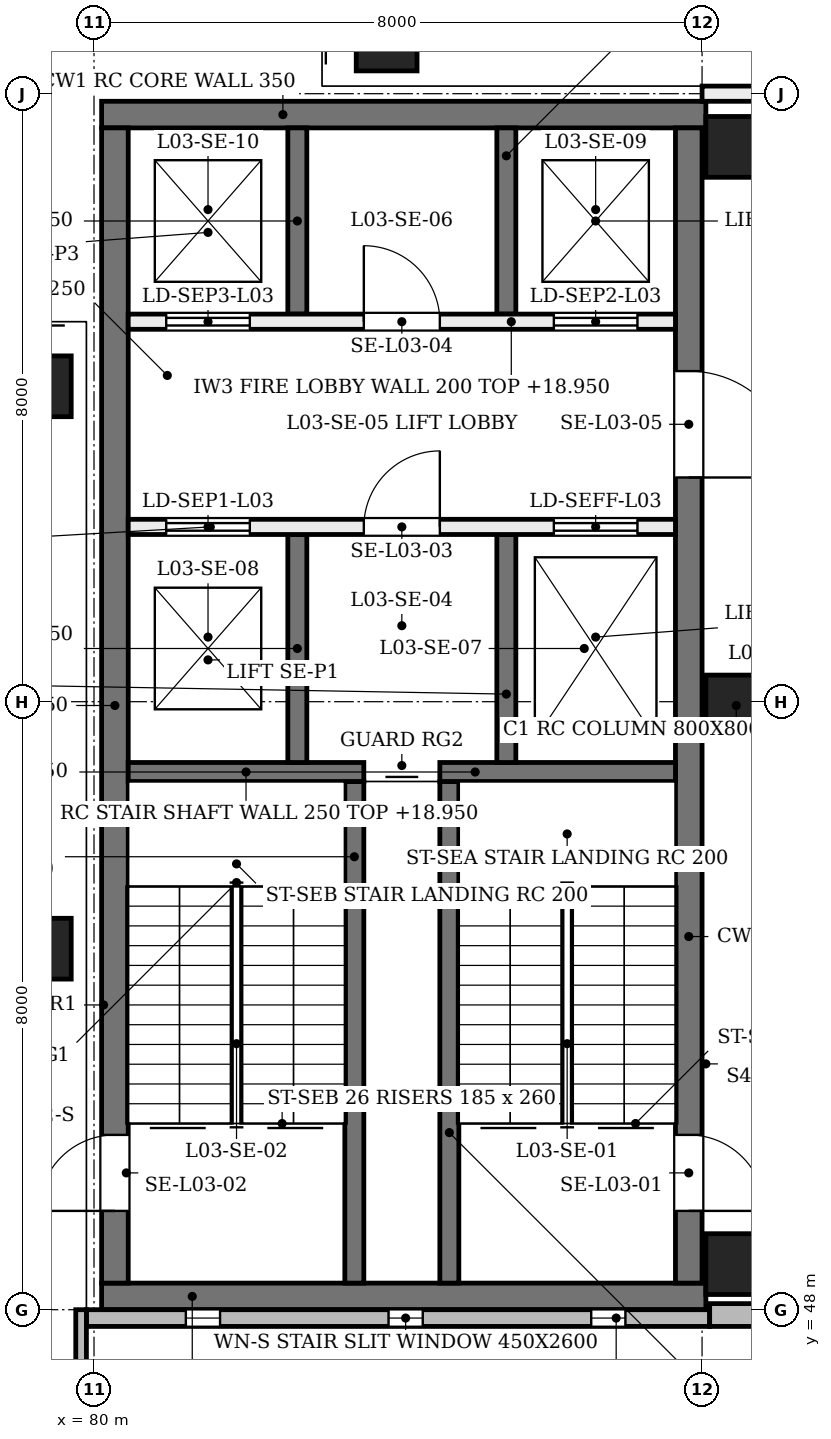
"""IFC4 building model, lengths in metres.
Left out: names, types, materials, properties, quantities, classifications, styles, units other than length and angle.
Written with IfcOpenShell. Run it as: python <this file> out.ifc"""

import sys

from ifc_helpers import new_model, si_unit, direction, frame, frame_2d, origin, origin_2d, place, context, subcontext, project, spatial, rectangle, extrude, element, fill, save


model = new_model("IFC4")
c1 = context("Model", 3, precision=1e-05, world=origin(), true_north=direction((0.0, 1.0)))
c2 = subcontext(c1, "Body", "Model", "MODEL_VIEW")
j1 = project(units=[si_unit("LENGTHUNIT", "METRE"), si_unit("PLANEANGLEUNIT", "RADIAN")], contexts=[c1])
p1 = place(None, origin())
s1 = spatial("IfcSite", under=j1, at=p1, CompositionType="ELEMENT")
p2 = place(p1, origin())
s2 = spatial("IfcBuilding", under=s1, at=p2, CompositionType="ELEMENT")
p3 = place(p2, frame((0.0, 0.0, 14.4)))
s3 = spatial("IfcBuildingStorey", under=s2, at=p3, CompositionType="ELEMENT", Elevation=14.4)
for number, where, z_axis, x_axis in (
    (1, (80.1, 48.175, 0.0), (0.0, 0.0, 1.0), (1.0, 0.0, 0.0)),
    (2, (80.1, 63.725, 0.0), (0.0, 0.0, 1.0), (1.0, 0.0, 0.0)),
):
    element("IfcWall", number, at=place(p3, frame(where, z_axis=z_axis, x_axis=x_axis)), inside=s3, PredefinedType="SHEAR", context=c2, shape_type="SweptSolid", body=[
        extrude(rectangle(XDim=7.95, YDim=0.35, at=frame_2d((3.975, 0.0))), origin(), (0.0, 0.0, 1.0), 4.58),
    ])
p4 = place(p3, frame((80.275, 48.35, 0.0), z_axis=(0.0, 0.0, 1.0), x_axis=(0.0, 1.0, 0.0)))
e3 = element("IfcWall", 3, at=p4, inside=s3, PredefinedType="SHEAR", context=c2, shape_type="SweptSolid", body=[
    extrude(rectangle(XDim=15.2, YDim=0.35, at=frame_2d((7.6, 0.0))), origin(), (0.0, 0.0, 1.0), 4.58),
])
p5 = place(p4, frame((0.95, 0.0, 0.0)))
e4 = element("IfcOpeningElement", 4, at=p5, cuts=e3, PredefinedType="OPENING", context=c2, shape_type="SweptSolid", body=[
    extrude(rectangle(XDim=1.0, YDim=2.1, at=frame_2d((0.5, 1.05))), frame((0.0, 0.185, 0.0), z_axis=(0.0, -1.0, 0.0), x_axis=(1.0, 0.0, 0.0)), (0.0, 0.0, 1.0), 0.37),
])
p6 = place(p3, frame((87.825, 48.35, 0.0), z_axis=(0.0, 0.0, 1.0), x_axis=(0.0, 1.0, 0.0)))
e5 = element("IfcWall", 5, at=p6, inside=s3, PredefinedType="SHEAR", context=c2, shape_type="SweptSolid", body=[
    extrude(rectangle(XDim=15.2, YDim=0.35, at=frame_2d((7.6, 0.0))), origin(), (0.0, 0.0, 1.0), 4.58),
])
p7 = place(p6, frame((0.95, 0.0, 0.0)))
e6 = element("IfcOpeningElement", 6, at=p7, cuts=e5, PredefinedType="OPENING", context=c2, shape_type="SweptSolid", body=[
    extrude(rectangle(XDim=1.0, YDim=2.1, at=frame_2d((0.5, 1.05))), frame((0.0, 0.185, 0.0), z_axis=(0.0, -1.0, 0.0), x_axis=(1.0, 0.0, 0.0)), (0.0, 0.0, 1.0), 0.37),
])
p8 = place(p6, frame((10.6, 0.0, 0.0)))
e7 = element("IfcOpeningElement", 7, at=p8, cuts=e5, PredefinedType="OPENING", context=c2, shape_type="SweptSolid", body=[
    extrude(rectangle(XDim=1.4, YDim=2.1, at=frame_2d((0.7, 1.05))), frame((0.0, 0.185, 0.0), z_axis=(0.0, -1.0, 0.0), x_axis=(1.0, 0.0, 0.0)), (0.0, 0.0, 1.0), 0.37),
])
for number, where, z_axis, x_axis in (
    (8, (88.45, 48.6, 0.0), (0.0, 0.0, 1.0), (1.0, 0.0, 0.0)),
    (9, (88.45, 55.95, 0.0), (0.0, 0.0, 1.0), (1.0, 0.0, 0.0)),
    (10, (88.45, 63.3, 0.0), (0.0, 0.0, 1.0), (1.0, 0.0, 0.0)),
):
    element("IfcColumn", number, at=place(p3, frame(where, z_axis=z_axis, x_axis=x_axis)), inside=s3, PredefinedType="COLUMN", context=c2, shape_type="SweptSolid", body=[
        extrude(rectangle(XDim=0.8, YDim=0.8, at=origin_2d()), origin(), (0.0, 0.0, 1.0), 4.8),
    ])
for number, where, z_axis, x_axis in (
    (11, (79.3, 53.0, 0.0), (0.0, -0.204, 0.979), (1.0, 0.0, 0.0)),
    (12, (79.3, 60.4, 0.0), (0.0, -0.204, 0.979), (1.0, 0.0, 0.0)),
    (13, (83.6, 64.7, 0.0), (0.204, 0.0, 0.979), (0.0, 1.0, 0.0)),
):
    element("IfcColumn", number, at=place(p3, frame(where, z_axis=z_axis, x_axis=x_axis)), inside=s3, PredefinedType="COLUMN", context=c2, shape_type="SweptSolid", body=[
        extrude(rectangle(XDim=0.8, YDim=0.8, at=origin_2d()), origin(), (0.0, 0.0, 1.0), 4.903),
    ])
p9 = place(p3, frame((79.9, 47.89, 0.0), z_axis=(0.0, 0.0, 1.0), x_axis=(1.0, 0.0, 0.0)))
e14 = element("IfcWall", 14, at=p9, inside=s3, PredefinedType="SOLIDWALL", context=c2, shape_type="SweptSolid", body=[
    extrude(rectangle(XDim=8.2, YDim=0.22, at=frame_2d((4.1, 0.0))), origin(), (0.0, 0.0, 1.0), 3.9),
])
p10 = place(p9, frame((1.308, 0.0, 0.9)))
e15 = element("IfcOpeningElement", 15, at=p10, cuts=e14, PredefinedType="OPENING", context=c2, shape_type="SweptSolid", body=[
    extrude(rectangle(XDim=0.45, YDim=2.6, at=frame_2d((0.225, 1.3))), frame((0.0, 0.12, 0.0), z_axis=(0.0, -1.0, 0.0), x_axis=(1.0, 0.0, 0.0)), (0.0, 0.0, 1.0), 0.24),
])
p11 = place(p9, frame((3.975, 0.0, 0.9)))
e16 = element("IfcOpeningElement", 16, at=p11, cuts=e14, PredefinedType="OPENING", context=c2, shape_type="SweptSolid", body=[
    extrude(rectangle(XDim=0.45, YDim=2.6, at=frame_2d((0.225, 1.3))), frame((0.0, 0.12, 0.0), z_axis=(0.0, -1.0, 0.0), x_axis=(1.0, 0.0, 0.0)), (0.0, 0.0, 1.0), 0.24),
])
p12 = place(p9, frame((6.642, 0.0, 0.9)))
e17 = element("IfcOpeningElement", 17, at=p12, cuts=e14, PredefinedType="OPENING", context=c2, shape_type="SweptSolid", body=[
    extrude(rectangle(XDim=0.45, YDim=2.6, at=frame_2d((0.225, 1.3))), frame((0.0, 0.12, 0.0), z_axis=(0.0, -1.0, 0.0), x_axis=(1.0, 0.0, 0.0)), (0.0, 0.0, 1.0), 0.24),
])
p13 = place(p3, frame((88.1, 47.93, 0.0), z_axis=(0.0, 0.0, 1.0), x_axis=(1.0, 0.0, 0.0)))
e18 = element("IfcWall", 18, at=p13, inside=s3, PredefinedType="SOLIDWALL", context=c2, shape_type="SweptSolid", body=[
    extrude(rectangle(XDim=7.9, YDim=0.3, at=frame_2d((3.95, 0.0))), origin(), (0.0, 0.0, 1.0), 3.9),
])
p14 = place(p13, frame((0.717, 0.0, 0.75)))
e19 = element("IfcOpeningElement", 19, at=p14, cuts=e18, PredefinedType="OPENING", context=c2, shape_type="SweptSolid", body=[
    extrude(rectangle(XDim=1.2, YDim=3.1, at=frame_2d((0.6, 1.55))), frame((0.0, 0.16, 0.0), z_axis=(0.0, -1.0, 0.0), x_axis=(1.0, 0.0, 0.0)), (0.0, 0.0, 1.0), 0.32),
])
p15 = place(p13, frame((3.35, 0.0, 0.75)))
e20 = element("IfcOpeningElement", 20, at=p15, cuts=e18, PredefinedType="OPENING", context=c2, shape_type="SweptSolid", body=[
    extrude(rectangle(XDim=1.2, YDim=3.1, at=frame_2d((0.6, 1.55))), frame((0.0, 0.16, 0.0), z_axis=(0.0, -1.0, 0.0), x_axis=(1.0, 0.0, 0.0)), (0.0, 0.0, 1.0), 0.32),
])
p16 = place(p13, frame((5.983, 0.0, 0.75)))
e21 = element("IfcOpeningElement", 21, at=p16, cuts=e18, PredefinedType="OPENING", context=c2, shape_type="SweptSolid", body=[
    extrude(rectangle(XDim=1.2, YDim=3.1, at=frame_2d((0.6, 1.55))), frame((0.0, 0.16, 0.0), z_axis=(0.0, -1.0, 0.0), x_axis=(1.0, 0.0, 0.0)), (0.0, 0.0, 1.0), 0.32),
])
p17 = place(p3, frame((79.83, 45.0, 0.0), z_axis=(0.0, 0.0, 1.0), x_axis=(0.0, 1.0, 0.0)))
e22 = element("IfcWall", 22, at=p17, inside=s3, PredefinedType="SOLIDWALL", context=c2, shape_type="SweptSolid", body=[
    extrude(rectangle(XDim=3.0, YDim=0.14, at=frame_2d((1.5, 0.0))), origin(), (0.0, 0.0, 1.0), 3.9),
])
for number, where, z_axis, x_axis in (
    (23, (84.675, 48.35, 0.0), (0.0, 0.0, 1.0), (0.0, 1.0, 0.0)),
    (24, (83.425, 48.35, 0.0), (0.0, 0.0, 1.0), (0.0, 1.0, 0.0)),
):
    element("IfcWall", number, at=place(p3, frame(where, z_axis=z_axis, x_axis=x_axis)), inside=s3, PredefinedType="SOLIDWALL", context=c2, shape_type="SweptSolid", body=[
        extrude(rectangle(XDim=6.6, YDim=0.25, at=frame_2d((3.3, 0.0))), origin(), (0.0, 0.0, 1.0), 4.55),
    ])
p18 = place(p3, frame((87.65, 55.075, 0.0), z_axis=(0.0, 0.0, 1.0), x_axis=(-1.0, 0.0, 0.0)))
e25 = element("IfcWall", 25, at=p18, inside=s3, PredefinedType="SOLIDWALL", context=c2, shape_type="SweptSolid", body=[
    extrude(rectangle(XDim=3.1, YDim=0.25, at=frame_2d((1.55, 0.0))), origin(), (0.0, 0.0, 1.0), 4.55),
])
p19 = place(p3, frame((83.55, 55.075, 0.0), z_axis=(0.0, 0.0, 1.0), x_axis=(-1.0, 0.0, 0.0)))
e26 = element("IfcWall", 26, at=p19, inside=s3, PredefinedType="SOLIDWALL", context=c2, shape_type="SweptSolid", body=[
    extrude(rectangle(XDim=3.1, YDim=0.25, at=frame_2d((1.55, 0.0))), origin(), (0.0, 0.0, 1.0), 4.55),
])
p20 = place(p3, frame((85.425, 55.2, 0.0), z_axis=(0.0, 0.0, 1.0), x_axis=(0.0, 1.0, 0.0)))
e27 = element("IfcWall", 27, at=p20, inside=s3, PredefinedType="SOLIDWALL", context=c2, shape_type="SweptSolid", body=[
    extrude(rectangle(XDim=3.0, YDim=0.25, at=frame_2d((1.5, 0.0))), origin(), (0.0, 0.0, 1.0), 4.55),
])
p21 = place(p3, frame((85.425, 61.1, 0.0), z_axis=(0.0, 0.0, 1.0), x_axis=(0.0, 1.0, 0.0)))
e28 = element("IfcWall", 28, at=p21, inside=s3, PredefinedType="SOLIDWALL", context=c2, shape_type="SweptSolid", body=[
    extrude(rectangle(XDim=2.45, YDim=0.25, at=frame_2d((1.225, 0.0))), origin(), (0.0, 0.0, 1.0), 4.55),
])
p22 = place(p3, frame((82.675, 55.2, 0.0), z_axis=(0.0, 0.0, 1.0), x_axis=(0.0, 1.0, 0.0)))
e29 = element("IfcWall", 29, at=p22, inside=s3, PredefinedType="SOLIDWALL", context=c2, shape_type="SweptSolid", body=[
    extrude(rectangle(XDim=3.0, YDim=0.25, at=frame_2d((1.5, 0.0))), origin(), (0.0, 0.0, 1.0), 4.55),
])
p23 = place(p3, frame((82.675, 61.1, 0.0), z_axis=(0.0, 0.0, 1.0), x_axis=(0.0, 1.0, 0.0)))
e30 = element("IfcWall", 30, at=p23, inside=s3, PredefinedType="SOLIDWALL", context=c2, shape_type="SweptSolid", body=[
    extrude(rectangle(XDim=2.45, YDim=0.25, at=frame_2d((1.225, 0.0))), origin(), (0.0, 0.0, 1.0), 4.55),
])
p24 = place(p3, frame((87.65, 58.3, 0.0), z_axis=(0.0, 0.0, 1.0), x_axis=(-1.0, 0.0, 0.0)))
e31 = element("IfcWall", 31, at=p24, inside=s3, PredefinedType="SOLIDWALL", context=c2, shape_type="SweptSolid", body=[
    extrude(rectangle(XDim=7.2, YDim=0.2, at=frame_2d((3.6, 0.0))), origin(), (0.0, 0.0, 1.0), 4.55),
])
p25 = place(p24, frame((0.5, 0.0, 0.0)))
e32 = element("IfcOpeningElement", 32, at=p25, cuts=e31, PredefinedType="OPENING", context=c2, shape_type="SweptSolid", body=[
    extrude(rectangle(XDim=1.1, YDim=2.1, at=frame_2d((0.55, 1.05))), frame((0.0, 0.11, 0.0), z_axis=(0.0, -1.0, 0.0), x_axis=(1.0, 0.0, 0.0)), (0.0, 0.0, 1.0), 0.22),
])
p26 = place(p24, frame((5.6, 0.0, 0.0)))
e33 = element("IfcOpeningElement", 33, at=p26, cuts=e31, PredefinedType="OPENING", context=c2, shape_type="SweptSolid", body=[
    extrude(rectangle(XDim=1.1, YDim=2.1, at=frame_2d((0.55, 1.05))), frame((0.0, 0.11, 0.0), z_axis=(0.0, -1.0, 0.0), x_axis=(1.0, 0.0, 0.0)), (0.0, 0.0, 1.0), 0.22),
])
p27 = place(p24, frame((3.1, 0.0, 0.0)))
e34 = element("IfcOpeningElement", 34, at=p27, cuts=e31, PredefinedType="OPENING", context=c2, shape_type="SweptSolid", body=[
    extrude(rectangle(XDim=1.0, YDim=2.1, at=frame_2d((0.5, 1.05))), frame((0.0, 0.11, 0.0), z_axis=(0.0, -1.0, 0.0), x_axis=(1.0, 0.0, 0.0)), (0.0, 0.0, 1.0), 0.22),
])
p28 = place(p3, frame((87.65, 61.0, 0.0), z_axis=(0.0, 0.0, 1.0), x_axis=(-1.0, 0.0, 0.0)))
e35 = element("IfcWall", 35, at=p28, inside=s3, PredefinedType="SOLIDWALL", context=c2, shape_type="SweptSolid", body=[
    extrude(rectangle(XDim=7.2, YDim=0.2, at=frame_2d((3.6, 0.0))), origin(), (0.0, 0.0, 1.0), 4.55),
])
p29 = place(p28, frame((0.5, 0.0, 0.0)))
e36 = element("IfcOpeningElement", 36, at=p29, cuts=e35, PredefinedType="OPENING", context=c2, shape_type="SweptSolid", body=[
    extrude(rectangle(XDim=1.1, YDim=2.1, at=frame_2d((0.55, 1.05))), frame((0.0, 0.11, 0.0), z_axis=(0.0, -1.0, 0.0), x_axis=(1.0, 0.0, 0.0)), (0.0, 0.0, 1.0), 0.22),
])
p30 = place(p28, frame((5.6, 0.0, 0.0)))
e37 = element("IfcOpeningElement", 37, at=p30, cuts=e35, PredefinedType="OPENING", context=c2, shape_type="SweptSolid", body=[
    extrude(rectangle(XDim=1.1, YDim=2.1, at=frame_2d((0.55, 1.05))), frame((0.0, 0.11, 0.0), z_axis=(0.0, -1.0, 0.0), x_axis=(1.0, 0.0, 0.0)), (0.0, 0.0, 1.0), 0.22),
])
p31 = place(p28, frame((3.1, 0.0, 0.0)))
e38 = element("IfcOpeningElement", 38, at=p31, cuts=e35, PredefinedType="OPENING", context=c2, shape_type="SweptSolid", body=[
    extrude(rectangle(XDim=1.0, YDim=2.1, at=frame_2d((0.5, 1.05))), frame((0.0, 0.11, 0.0), z_axis=(0.0, -1.0, 0.0), x_axis=(1.0, 0.0, 0.0)), (0.0, 0.0, 1.0), 0.22),
])
p32 = place(p3, frame((88.0, 64.0, 0.0), z_axis=(0.0, 0.0, 1.0), x_axis=(1.0, 0.0, 0.0)))
e39 = element("IfcWall", 39, at=p32, inside=s3, PredefinedType="PARTITIONING", context=c2, shape_type="SweptSolid", body=[
    extrude(rectangle(XDim=3.6, YDim=0.2, at=frame_2d((1.8, 0.0))), origin(), (0.0, 0.0, 1.0), 3.88),
])
p33 = place(p32, frame((1.3, 0.0, 0.0)))
e40 = element("IfcOpeningElement", 40, at=p33, cuts=e39, PredefinedType="OPENING", context=c2, shape_type="SweptSolid", body=[
    extrude(rectangle(XDim=1.0, YDim=2.1, at=frame_2d((0.5, 1.05))), frame((0.0, 0.11, 0.0), z_axis=(0.0, -1.0, 0.0), x_axis=(1.0, 0.0, 0.0)), (0.0, 0.0, 1.0), 0.22),
])
p34 = place(p10, origin())
e41 = element("IfcWindow", 41, at=p34, inside=s3, PartitioningType="SINGLE_PANEL", PredefinedType="WINDOW", context=c2, shape_type="SweptSolid", body=[
    extrude(rectangle(XDim=0.45, YDim=2.6, at=frame_2d((0.225, 1.3))), frame((0.0, 0.03, 0.0), z_axis=(0.0, -1.0, 0.0), x_axis=(1.0, 0.0, 0.0)), (0.0, 0.0, 1.0), 0.06),
])
fill(e15, e41)
p35 = place(p11, origin())
e42 = element("IfcWindow", 42, at=p35, inside=s3, PartitioningType="SINGLE_PANEL", PredefinedType="WINDOW", context=c2, shape_type="SweptSolid", body=[
    extrude(rectangle(XDim=0.45, YDim=2.6, at=frame_2d((0.225, 1.3))), frame((0.0, 0.03, 0.0), z_axis=(0.0, -1.0, 0.0), x_axis=(1.0, 0.0, 0.0)), (0.0, 0.0, 1.0), 0.06),
])
fill(e16, e42)
p36 = place(p12, origin())
e43 = element("IfcWindow", 43, at=p36, inside=s3, PartitioningType="SINGLE_PANEL", PredefinedType="WINDOW", context=c2, shape_type="SweptSolid", body=[
    extrude(rectangle(XDim=0.45, YDim=2.6, at=frame_2d((0.225, 1.3))), frame((0.0, 0.03, 0.0), z_axis=(0.0, -1.0, 0.0), x_axis=(1.0, 0.0, 0.0)), (0.0, 0.0, 1.0), 0.06),
])
fill(e17, e43)
p37 = place(p7, frame((1.0, 0.0, 0.0), z_axis=(0.0, 0.0, 1.0), x_axis=(-1.0, 0.0, 0.0)))
e44 = element("IfcDoor", 44, at=p37, inside=s3, OperationType="SINGLE_SWING_LEFT", PredefinedType="DOOR", context=c2, shape_type="SweptSolid", body=[
    extrude(rectangle(XDim=1.0, YDim=2.1, at=frame_2d((0.5, 1.05))), frame((0.0, 0.025, 0.0), z_axis=(0.0, -1.0, 0.0), x_axis=(1.0, 0.0, 0.0)), (0.0, 0.0, 1.0), 0.05),
])
fill(e6, e44)
p38 = place(p5, origin())
e45 = element("IfcDoor", 45, at=p38, inside=s3, OperationType="SINGLE_SWING_LEFT", PredefinedType="DOOR", context=c2, shape_type="SweptSolid", body=[
    extrude(rectangle(XDim=1.0, YDim=2.1, at=frame_2d((0.5, 1.05))), frame((0.0, 0.025, 0.0), z_axis=(0.0, -1.0, 0.0), x_axis=(1.0, 0.0, 0.0)), (0.0, 0.0, 1.0), 0.05),
])
fill(e4, e45)
p39 = place(p25, frame((1.1, 0.0, 0.0), z_axis=(0.0, 0.0, 1.0), x_axis=(-1.0, 0.0, 0.0)))
e46 = element("IfcDoor", 46, at=p39, inside=s3, OperationType="DOUBLE_DOOR_SLIDING", PredefinedType="DOOR", context=c2, shape_type="SweptSolid", body=[
    extrude(rectangle(XDim=1.1, YDim=2.1, at=frame_2d((0.55, 1.05))), frame((0.0, 0.025, 0.0), z_axis=(0.0, -1.0, 0.0), x_axis=(1.0, 0.0, 0.0)), (0.0, 0.0, 1.0), 0.05),
])
fill(e32, e46)
p40 = place(p26, frame((1.1, 0.0, 0.0), z_axis=(0.0, 0.0, 1.0), x_axis=(-1.0, 0.0, 0.0)))
e47 = element("IfcDoor", 47, at=p40, inside=s3, OperationType="DOUBLE_DOOR_SLIDING", PredefinedType="DOOR", context=c2, shape_type="SweptSolid", body=[
    extrude(rectangle(XDim=1.1, YDim=2.1, at=frame_2d((0.55, 1.05))), frame((0.0, 0.025, 0.0), z_axis=(0.0, -1.0, 0.0), x_axis=(1.0, 0.0, 0.0)), (0.0, 0.0, 1.0), 0.05),
])
fill(e33, e47)
p41 = place(p29, origin())
e48 = element("IfcDoor", 48, at=p41, inside=s3, OperationType="DOUBLE_DOOR_SLIDING", PredefinedType="DOOR", context=c2, shape_type="SweptSolid", body=[
    extrude(rectangle(XDim=1.1, YDim=2.1, at=frame_2d((0.55, 1.05))), frame((0.0, 0.025, 0.0), z_axis=(0.0, -1.0, 0.0), x_axis=(1.0, 0.0, 0.0)), (0.0, 0.0, 1.0), 0.05),
])
fill(e36, e48)
p42 = place(p30, origin())
e49 = element("IfcDoor", 49, at=p42, inside=s3, OperationType="DOUBLE_DOOR_SLIDING", PredefinedType="DOOR", context=c2, shape_type="SweptSolid", body=[
    extrude(rectangle(XDim=1.1, YDim=2.1, at=frame_2d((0.55, 1.05))), frame((0.0, 0.025, 0.0), z_axis=(0.0, -1.0, 0.0), x_axis=(1.0, 0.0, 0.0)), (0.0, 0.0, 1.0), 0.05),
])
fill(e37, e49)
p43 = place(p27, frame((1.0, 0.0, 0.0), z_axis=(0.0, 0.0, 1.0), x_axis=(-1.0, 0.0, 0.0)))
e50 = element("IfcDoor", 50, at=p43, inside=s3, OperationType="SINGLE_SWING_LEFT", PredefinedType="DOOR", context=c2, shape_type="SweptSolid", body=[
    extrude(rectangle(XDim=1.0, YDim=2.1, at=frame_2d((0.5, 1.05))), frame((0.0, 0.025, 0.0), z_axis=(0.0, -1.0, 0.0), x_axis=(1.0, 0.0, 0.0)), (0.0, 0.0, 1.0), 0.05),
])
fill(e34, e50)
p44 = place(p31, origin())
e51 = element("IfcDoor", 51, at=p44, inside=s3, OperationType="SINGLE_SWING_RIGHT", PredefinedType="DOOR", context=c2, shape_type="SweptSolid", body=[
    extrude(rectangle(XDim=1.0, YDim=2.1, at=frame_2d((0.5, 1.05))), frame((0.0, 0.025, 0.0), z_axis=(0.0, -1.0, 0.0), x_axis=(1.0, 0.0, 0.0)), (0.0, 0.0, 1.0), 0.05),
])
fill(e38, e51)
p45 = place(p8, frame((1.4, 0.0, 0.0), z_axis=(0.0, 0.0, 1.0), x_axis=(-1.0, 0.0, 0.0)))
e52 = element("IfcDoor", 52, at=p45, inside=s3, OperationType="SINGLE_SWING_LEFT", PredefinedType="DOOR", context=c2, shape_type="SweptSolid", body=[
    extrude(rectangle(XDim=1.4, YDim=2.1, at=frame_2d((0.7, 1.05))), frame((0.0, 0.025, 0.0), z_axis=(0.0, -1.0, 0.0), x_axis=(1.0, 0.0, 0.0)), (0.0, 0.0, 1.0), 0.05),
])
fill(e7, e52)
save(model, sys.argv[1])
